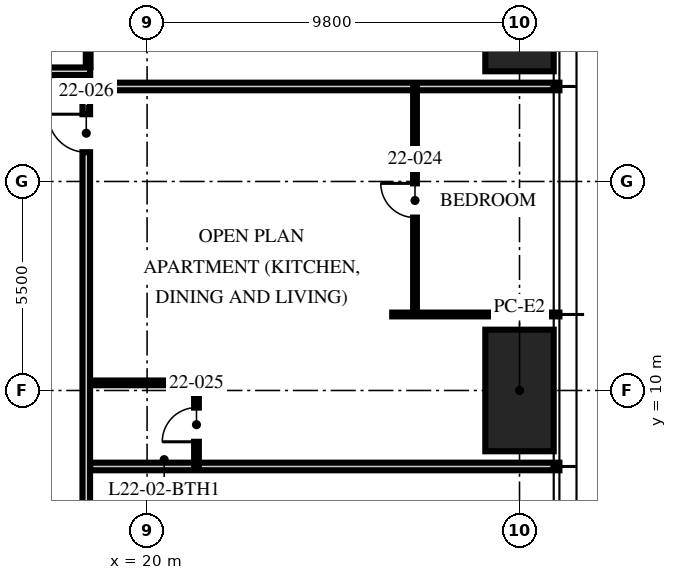
"""IFC4 building model, lengths in metres.
Left out: names, types, materials, properties, quantities, classifications, styles, units other than length and angle.
Written with IfcOpenShell. Run it as: python <this file> out.ifc"""

import sys

from ifc_helpers import new_model, si_unit, direction, frame, frame_2d, origin, origin_2d, place, context, subcontext, project, spatial, rectangle, hollow_rectangle, extrude, element, fill, save


model = new_model("IFC4")
c1 = context("Model", 3, precision=1e-05, world=origin(), true_north=direction((0.0, 1.0)))
c2 = subcontext(c1, "Body", "Model", "MODEL_VIEW")
j1 = project(units=[si_unit("LENGTHUNIT", "METRE"), si_unit("PLANEANGLEUNIT", "RADIAN")], contexts=[c1])
p1 = place(None, origin())
s1 = spatial("IfcSite", under=j1, at=p1, CompositionType="ELEMENT")
p2 = place(p1, origin())
s2 = spatial("IfcBuilding", under=s1, at=p2, CompositionType="ELEMENT")
p3 = place(p2, frame((0.0, 0.0, 88.5)))
s3 = spatial("IfcBuildingStorey", under=s2, at=p3, CompositionType="ELEMENT", Elevation=88.5)
for number, where, z_axis, x_axis in (
    (1, (29.8, 20.0, 0.0), (0.0, 0.0, 1.0), (0.0, 1.0, 0.0)),
    (2, (29.8, 10.0, 0.0), (0.0, 0.0, 1.0), (0.0, 1.0, 0.0)),
):
    element("IfcColumn", number, at=place(p3, frame(where, z_axis=z_axis, x_axis=x_axis)), inside=s3, PredefinedType="COLUMN", context=c2, shape_type="SweptSolid", body=[
        extrude(hollow_rectangle(XDim=3.2, YDim=1.8, WallThickness=0.2, at=origin_2d()), origin(), (0.0, 0.0, 1.0), 3.75),
    ])
p4 = place(p3, frame((18.5, 8.0, 0.0), z_axis=(0.0, 0.0, 1.0), x_axis=(1.0, 0.0, 0.0)))
e3 = element("IfcWall", 3, at=p4, inside=s3, PredefinedType="PARTITIONING", context=c2, shape_type="SweptSolid", body=[
    extrude(rectangle(XDim=12.35, YDim=0.2, at=frame_2d((6.175, 0.0))), origin(), (0.0, 0.0, 1.0), 2.71),
])
p5 = place(p3, frame((26.45, 12.0, 0.0), z_axis=(0.0, 0.0, 1.0), x_axis=(1.0, 0.0, 0.0)))
e4 = element("IfcWall", 4, at=p5, inside=s3, PredefinedType="PARTITIONING", context=c2, shape_type="SweptSolid", body=[
    extrude(rectangle(XDim=4.4, YDim=0.1, at=frame_2d((2.2, 0.0))), origin(), (0.0, 0.0, 1.0), 2.71),
])
p6 = place(p3, frame((18.5, 18.0, 0.0), z_axis=(0.0, 0.0, 1.0), x_axis=(1.0, 0.0, 0.0)))
e5 = element("IfcWall", 5, at=p6, inside=s3, PredefinedType="PARTITIONING", context=c2, shape_type="SweptSolid", body=[
    extrude(rectangle(XDim=12.35, YDim=0.2, at=frame_2d((6.175, 0.0))), origin(), (0.0, 0.0, 1.0), 2.3),
])
p7 = place(p3, frame((27.05, 12.0, 0.0), z_axis=(0.0, 0.0, 1.0), x_axis=(0.0, 1.0, 0.0)))
e6 = element("IfcWall", 6, at=p7, inside=s3, PredefinedType="PARTITIONING", context=c2, shape_type="SweptSolid", body=[
    extrude(rectangle(XDim=6.0, YDim=0.1, at=frame_2d((3.0, 0.0))), origin(), (0.0, 0.0, 1.0), 2.61),
])
p8 = place(p7, frame((2.55, 0.0, 0.0)))
e7 = element("IfcOpeningElement", 7, at=p8, cuts=e6, PredefinedType="OPENING", context=c2, shape_type="SweptSolid", body=[
    extrude(rectangle(XDim=0.9, YDim=2.1, at=frame_2d((0.45, 1.05))), frame((0.0, 0.06, 0.0), z_axis=(0.0, -1.0, 0.0), x_axis=(1.0, 0.0, 0.0)), (0.0, 0.0, 1.0), 0.12),
])
p9 = place(p3, frame((21.3, 8.0, 0.0), z_axis=(0.0, 0.0, 1.0), x_axis=(0.0, 1.0, 0.0)))
e8 = element("IfcWall", 8, at=p9, inside=s3, PredefinedType="PARTITIONING", context=c2, shape_type="SweptSolid", body=[
    extrude(rectangle(XDim=2.2, YDim=0.125, at=frame_2d((1.1, 0.0))), origin(), (0.0, 0.0, 1.0), 2.492),
])
p10 = place(p9, frame((0.65, 0.0, 0.0)))
e9 = element("IfcOpeningElement", 9, at=p10, cuts=e8, PredefinedType="OPENING", context=c2, shape_type="SweptSolid", body=[
    extrude(rectangle(XDim=0.9, YDim=2.1, at=frame_2d((0.45, 1.05))), frame((0.0, 0.073, 0.0), z_axis=(0.0, -1.0, 0.0), x_axis=(1.0, 0.0, 0.0)), (0.0, 0.0, 1.0), 0.145),
])
p11 = place(p3, frame((18.5, 10.2, 0.0), z_axis=(0.0, 0.0, 1.0), x_axis=(1.0, 0.0, 0.0)))
e10 = element("IfcWall", 10, at=p11, inside=s3, PredefinedType="PARTITIONING", context=c2, shape_type="SweptSolid", body=[
    extrude(rectangle(XDim=2.8, YDim=0.125, at=frame_2d((1.4, 0.0))), origin(), (0.0, 0.0, 1.0), 2.492),
])
p12 = place(p3, frame((18.45, 18.5, 0.0), z_axis=(0.0, 0.0, 1.0), x_axis=(0.0, 1.0, 0.0)))
e11 = element("IfcWall", 11, at=p12, inside=s3, PredefinedType="PARTITIONING", context=c2, shape_type="SweptSolid", body=[
    extrude(rectangle(XDim=2.8, YDim=0.125, at=frame_2d((1.4, 0.0))), origin(), (0.0, 0.0, 1.0), 2.3),
])
p13 = place(p3, frame((18.4, -6.0, 0.0), z_axis=(0.0, 0.0, 1.0), x_axis=(0.0, 1.0, 0.0)))
e12 = element("IfcWall", 12, at=p13, inside=s3, PredefinedType="PARTITIONING", context=c2, shape_type="SweptSolid", body=[
    extrude(rectangle(XDim=24.3, YDim=0.2, at=frame_2d((12.15, 0.0))), origin(), (0.0, 0.0, 1.0), 2.3),
])
p14 = place(p13, frame((22.27, 0.0, 0.0)))
e13 = element("IfcOpeningElement", 13, at=p14, cuts=e12, PredefinedType="OPENING", context=c2, shape_type="SweptSolid", body=[
    extrude(rectangle(XDim=1.0, YDim=2.2, at=frame_2d((0.5, 1.1))), frame((0.0, 0.11, 0.0), z_axis=(0.0, -1.0, 0.0), x_axis=(1.0, 0.0, 0.0)), (0.0, 0.0, 1.0), 0.22),
])
p15 = place(p3, frame((10.0, 18.4, 0.0), z_axis=(0.0, 0.0, 1.0), x_axis=(1.0, 0.0, 0.0)))
e14 = element("IfcWall", 14, at=p15, inside=s3, PredefinedType="PARTITIONING", context=c2, shape_type="SweptSolid", body=[
    extrude(rectangle(XDim=8.5, YDim=0.2, at=frame_2d((4.25, 0.0))), origin(), (0.0, 0.0, 1.0), 2.3),
])
p16 = place(p8, origin())
e15 = element("IfcDoor", 15, at=p16, inside=s3, OperationType="SINGLE_SWING_RIGHT", PredefinedType="DOOR", context=c2, shape_type="SweptSolid", body=[
    extrude(rectangle(XDim=0.9, YDim=2.1, at=frame_2d((0.45, 1.05))), frame((0.0, 0.025, 0.0), z_axis=(0.0, -1.0, 0.0), x_axis=(1.0, 0.0, 0.0)), (0.0, 0.0, 1.0), 0.05),
])
fill(e7, e15)
p17 = place(p10, origin())
e16 = element("IfcDoor", 16, at=p17, inside=s3, OperationType="SINGLE_SWING_LEFT", PredefinedType="DOOR", context=c2, shape_type="SweptSolid", body=[
    extrude(rectangle(XDim=0.9, YDim=2.1, at=frame_2d((0.45, 1.05))), frame((0.0, 0.025, 0.0), z_axis=(0.0, -1.0, 0.0), x_axis=(1.0, 0.0, 0.0)), (0.0, 0.0, 1.0), 0.05),
])
fill(e9, e16)
p18 = place(p14, origin())
e17 = element("IfcDoor", 17, at=p18, inside=s3, OperationType="SINGLE_SWING_RIGHT", PredefinedType="DOOR", context=c2, shape_type="SweptSolid", body=[
    extrude(rectangle(XDim=1.0, YDim=2.2, at=frame_2d((0.5, 1.1))), frame((0.0, 0.025, 0.0), z_axis=(0.0, -1.0, 0.0), x_axis=(1.0, 0.0, 0.0)), (0.0, 0.0, 1.0), 0.05),
])
fill(e13, e17)
save(model, sys.argv[1])
